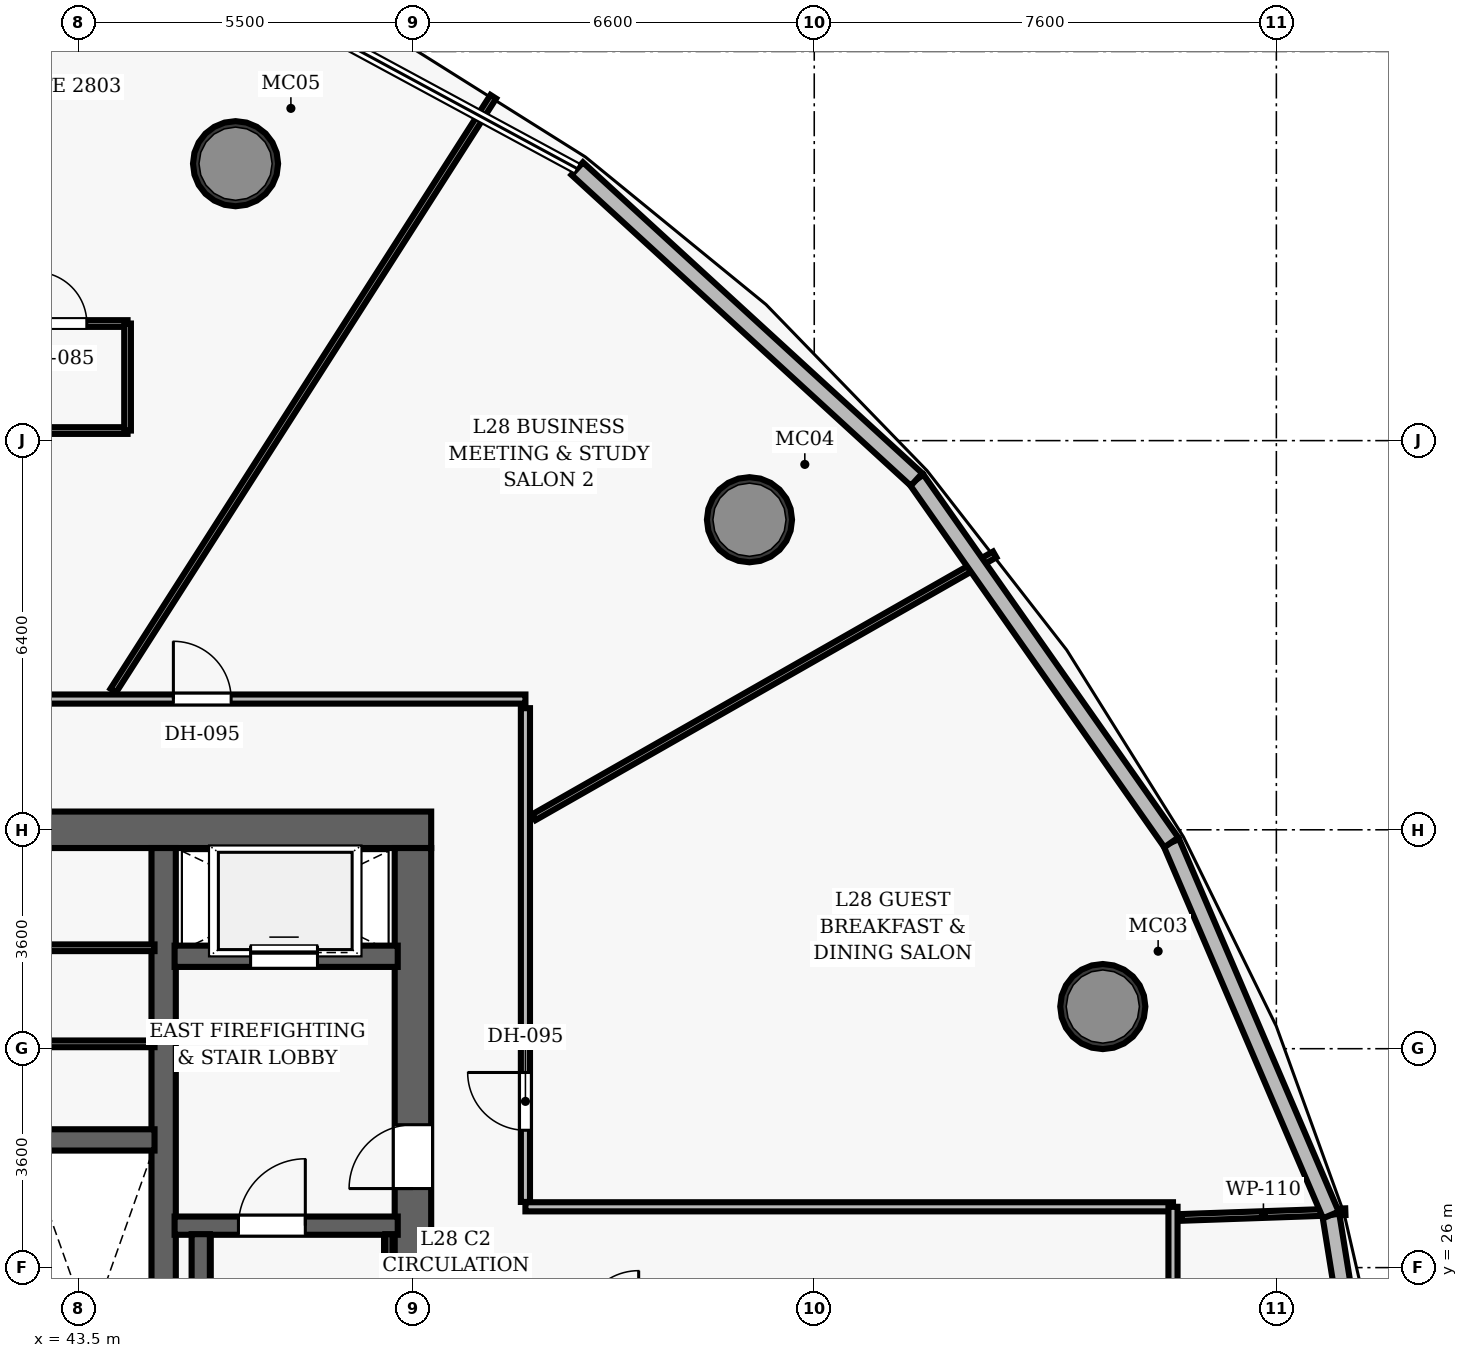
"""IFC4 building model, lengths in metres.
Left out: names, types, materials, properties, quantities, classifications, styles, units other than length and angle.
Written with IfcOpenShell. Run it as: python <this file> out.ifc"""

import sys

from ifc_helpers import new_model, si_unit, direction, frame, frame_2d, origin, origin_2d, place, context, subcontext, project, spatial, rectangle, hollow_circle, extrude, element, fill, save


model = new_model("IFC4")
c1 = context("Model", 3, precision=1e-05, world=origin(), true_north=direction((0.0, 1.0)))
c2 = subcontext(c1, "Body", "Model", "MODEL_VIEW")
j1 = project(units=[si_unit("LENGTHUNIT", "METRE"), si_unit("PLANEANGLEUNIT", "RADIAN")], contexts=[c1])
p1 = place(None, origin())
s1 = spatial("IfcSite", under=j1, at=p1, CompositionType="ELEMENT")
p2 = place(p1, origin())
s2 = spatial("IfcBuilding", under=s1, at=p2, CompositionType="ELEMENT")
p3 = place(p2, frame((0.0, 0.0, 116.8)))
s3 = spatial("IfcBuildingStorey", under=s2, at=p3, CompositionType="ELEMENT", Elevation=116.8)
p4 = place(p3, frame((26.7, 33.2, 0.0), z_axis=(0.0, 0.0, 1.0), x_axis=(1.0, 0.0, 0.0)))
e1 = element("IfcWall", 1, at=p4, inside=s3, PredefinedType="SHEAR", context=c2, shape_type="SweptSolid", body=[
    extrude(rectangle(XDim=22.6, YDim=0.6, at=frame_2d((11.3, 0.0))), origin(), (0.0, 0.0, 1.0), 3.5),
])
p5 = place(p4, frame((4.62, 0.0, 0.0)))
e2 = element("IfcOpeningElement", 2, at=p5, cuts=e1, PredefinedType="OPENING", context=c2, shape_type="SweptSolid", body=[
    extrude(rectangle(XDim=1.05, YDim=2.15, at=frame_2d((0.525, 1.075))), frame((0.0, 0.31, 0.0), z_axis=(0.0, -1.0, 0.0), x_axis=(1.0, 0.0, 0.0)), (0.0, 0.0, 1.0), 0.62),
])
p6 = place(p4, frame((14.52, 0.0, 0.0)))
e3 = element("IfcOpeningElement", 3, at=p6, cuts=e1, PredefinedType="OPENING", context=c2, shape_type="SweptSolid", body=[
    extrude(rectangle(XDim=1.05, YDim=2.15, at=frame_2d((0.525, 1.075))), frame((0.0, 0.31, 0.0), z_axis=(0.0, -1.0, 0.0), x_axis=(1.0, 0.0, 0.0)), (0.0, 0.0, 1.0), 0.62),
])
p7 = place(p3, frame((49.0, 19.1, 0.0), z_axis=(0.0, 0.0, 1.0), x_axis=(0.0, 1.0, 0.0)))
e4 = element("IfcWall", 4, at=p7, inside=s3, PredefinedType="SHEAR", context=c2, shape_type="SweptSolid", body=[
    extrude(rectangle(XDim=13.8, YDim=0.6, at=frame_2d((6.9, 0.0))), origin(), (0.0, 0.0, 1.0), 3.5),
])
p8 = place(p7, frame((8.2, 0.0, 0.0)))
e5 = element("IfcOpeningElement", 5, at=p8, cuts=e4, PredefinedType="OPENING", context=c2, shape_type="SweptSolid", body=[
    extrude(rectangle(XDim=1.05, YDim=2.15, at=frame_2d((0.525, 1.075))), frame((0.0, 0.31, 0.0), z_axis=(0.0, -1.0, 0.0), x_axis=(1.0, 0.0, 0.0)), (0.0, 0.0, 1.0), 0.62),
])
p9 = place(p3, frame((44.9, 19.1, 0.0), z_axis=(0.0, 0.0, 1.0), x_axis=(0.0, 1.0, 0.0)))
e6 = element("IfcWall", 6, at=p9, inside=s3, PredefinedType="SHEAR", context=c2, shape_type="SweptSolid", body=[
    extrude(rectangle(XDim=13.8, YDim=0.4, at=frame_2d((6.9, 0.0))), origin(), (0.0, 0.0, 1.0), 3.5),
])
for number, where, z_axis, x_axis in (
    (7, (60.346, 30.293, 0.0), (0.0, 0.0, 1.0), (1.0, 0.0, 0.0)),
    (8, (54.535, 38.299, 0.0), (0.0, 0.0, 1.0), (1.0, 0.0, 0.0)),
    (9, (46.083, 44.154, 0.0), (0.0, 0.0, 1.0), (1.0, 0.0, 0.0)),
):
    element("IfcColumn", number, at=place(p3, frame(where, z_axis=z_axis, x_axis=x_axis)), inside=s3, PredefinedType="COLUMN", context=c2, shape_type="SweptSolid", body=[
        extrude(hollow_circle(Radius=0.7, WallThickness=0.055, at=origin_2d()), origin(), (0.0, 0.0, 1.0), 3.5),
    ])
p10 = place(p3, frame((45.08, 26.69, 0.0), z_axis=(0.0, 0.0, 1.0), x_axis=(1.0, 0.0, 0.0)))
e10 = element("IfcWall", 10, at=p10, inside=s3, PredefinedType="SHEAR", context=c2, shape_type="SweptSolid", body=[
    extrude(rectangle(XDim=3.67, YDim=0.3, at=frame_2d((1.835, 0.0))), origin(), (0.0, 0.0, 1.0), 3.5),
])
p11 = place(p10, frame((1.05, 0.0, 0.0)))
e11 = element("IfcOpeningElement", 11, at=p11, cuts=e10, PredefinedType="OPENING", context=c2, shape_type="SweptSolid", body=[
    extrude(rectangle(XDim=1.1, YDim=2.15, at=frame_2d((0.55, 1.075))), frame((0.0, 0.16, 0.0), z_axis=(0.0, -1.0, 0.0), x_axis=(1.0, 0.0, 0.0)), (0.0, 0.0, 1.0), 0.32),
])
p12 = place(p3, frame((45.51, 19.05, 0.0), z_axis=(0.0, 0.0, 1.0), x_axis=(0.0, 1.0, 0.0)))
e12 = element("IfcWall", 12, at=p12, inside=s3, PredefinedType="SHEAR", context=c2, shape_type="SweptSolid", body=[
    extrude(rectangle(XDim=7.5, YDim=0.3, at=frame_2d((3.75, 0.0))), origin(), (0.0, 0.0, 1.0), 3.5),
])
p13 = place(p3, frame((48.605, 19.1, 0.0), z_axis=(0.0, 0.0, 1.0), x_axis=(0.0, 1.0, 0.0)))
e13 = element("IfcWall", 13, at=p13, inside=s3, PredefinedType="SHEAR", context=c2, shape_type="SweptSolid", body=[
    extrude(rectangle(XDim=7.45, YDim=0.12, at=frame_2d((3.725, 0.0))), origin(), (0.0, 0.0, 1.0), 3.5),
])
p14 = place(p3, frame((45.08, 31.12, 0.0), z_axis=(0.0, 0.0, 1.0), x_axis=(1.0, 0.0, 0.0)))
e14 = element("IfcWall", 14, at=p14, inside=s3, PredefinedType="SHEAR", context=c2, shape_type="SweptSolid", body=[
    extrude(rectangle(XDim=3.67, YDim=0.35, at=frame_2d((1.835, 0.0))), origin(), (0.0, 0.0, 1.0), 2.675),
])
p15 = place(p14, frame((1.25, 0.0, 0.0)))
e15 = element("IfcOpeningElement", 15, at=p15, cuts=e14, PredefinedType="OPENING", context=c2, shape_type="SweptSolid", body=[
    extrude(rectangle(XDim=1.1, YDim=2.15, at=frame_2d((0.55, 1.075))), frame((0.0, 0.185, 0.0), z_axis=(0.0, -1.0, 0.0), x_axis=(1.0, 0.0, 0.0)), (0.0, 0.0, 1.0), 0.37),
])
p16 = place(p3, frame((42.72, 28.1, 0.0), z_axis=(0.0, 0.0, 1.0), x_axis=(1.0, 0.0, 0.0)))
e16 = element("IfcWall", 16, at=p16, inside=s3, PredefinedType="SHEAR", context=c2, shape_type="SweptSolid", body=[
    extrude(rectangle(XDim=2.03, YDim=0.35, at=frame_2d((1.015, 0.0))), origin(), (0.0, 0.0, 1.0), 2.675),
])
for number, where, z_axis, x_axis in (
    (17, (42.55, 29.68, 0.0), (0.0, 0.0, 1.0), (1.0, 0.0, 0.0)),
    (18, (42.55, 31.26, 0.0), (0.0, 0.0, 1.0), (1.0, 0.0, 0.0)),
):
    element("IfcWall", number, at=place(p3, frame(where, z_axis=z_axis, x_axis=x_axis)), inside=s3, PredefinedType="PARTITIONING", context=c2, shape_type="SweptSolid", body=[
        extrude(rectangle(XDim=2.2, YDim=0.11, at=frame_2d((1.1, 0.0))), origin(), (0.0, 0.0, 1.0), 2.675),
    ])
p17 = place(p3, frame((24.85, 35.35, 0.0), z_axis=(0.0, 0.0, 1.0), x_axis=(1.0, 0.0, 0.0)))
e19 = element("IfcWall", 19, at=p17, inside=s3, PredefinedType="PARTITIONING", context=c2, shape_type="SweptSolid", body=[
    extrude(rectangle(XDim=26.0, YDim=0.15, at=frame_2d((13.0, 0.0))), origin(), (0.0, 0.0, 1.0), 2.675),
])
p18 = place(p17, frame((20.21, 0.0, 0.0)))
e20 = element("IfcOpeningElement", 20, at=p18, cuts=e19, PredefinedType="OPENING", context=c2, shape_type="SweptSolid", body=[
    extrude(rectangle(XDim=0.95, YDim=2.15, at=frame_2d((0.475, 1.075))), frame((0.0, 0.085, 0.0), z_axis=(0.0, -1.0, 0.0), x_axis=(1.0, 0.0, 0.0)), (0.0, 0.0, 1.0), 0.17),
])
p19 = place(p17, frame((14.655, 0.0, 0.0)))
e21 = element("IfcOpeningElement", 21, at=p19, cuts=e19, PredefinedType="OPENING", context=c2, shape_type="SweptSolid", body=[
    extrude(rectangle(XDim=0.95, YDim=2.15, at=frame_2d((0.475, 1.075))), frame((0.0, 0.085, 0.0), z_axis=(0.0, -1.0, 0.0), x_axis=(1.0, 0.0, 0.0)), (0.0, 0.0, 1.0), 0.17),
])
p20 = place(p17, frame((12.441, 0.0, 0.0)))
e22 = element("IfcOpeningElement", 22, at=p20, cuts=e19, PredefinedType="OPENING", context=c2, shape_type="SweptSolid", body=[
    extrude(rectangle(XDim=0.95, YDim=2.15, at=frame_2d((0.475, 1.075))), frame((0.0, 0.085, 0.0), z_axis=(0.0, -1.0, 0.0), x_axis=(1.0, 0.0, 0.0)), (0.0, 0.0, 1.0), 0.17),
])
p21 = place(p17, frame((6.959, 0.0, 0.0)))
e23 = element("IfcOpeningElement", 23, at=p21, cuts=e19, PredefinedType="OPENING", context=c2, shape_type="SweptSolid", body=[
    extrude(rectangle(XDim=0.95, YDim=2.15, at=frame_2d((0.475, 1.075))), frame((0.0, 0.085, 0.0), z_axis=(0.0, -1.0, 0.0), x_axis=(1.0, 0.0, 0.0)), (0.0, 0.0, 1.0), 0.17),
])
p22 = place(p3, frame((50.85, 27.08, 0.0), z_axis=(0.0, 0.0, 1.0), x_axis=(0.0, 1.0, 0.0)))
e24 = element("IfcWall", 24, at=p22, inside=s3, PredefinedType="PARTITIONING", context=c2, shape_type="SweptSolid", body=[
    extrude(rectangle(XDim=8.12, YDim=0.15, at=frame_2d((4.06, 0.0))), origin(), (0.0, 0.0, 1.0), 2.675),
])
p23 = place(p22, frame((1.179, 0.0, 0.0)))
e25 = element("IfcOpeningElement", 25, at=p23, cuts=e24, PredefinedType="OPENING", context=c2, shape_type="SweptSolid", body=[
    extrude(rectangle(XDim=0.95, YDim=2.15, at=frame_2d((0.475, 1.075))), frame((0.0, 0.085, 0.0), z_axis=(0.0, -1.0, 0.0), x_axis=(1.0, 0.0, 0.0)), (0.0, 0.0, 1.0), 0.17),
])
p24 = place(p3, frame((50.85, 27.0, 0.0), z_axis=(0.0, 0.0, 1.0), x_axis=(1.0, 0.0, 0.0)))
e26 = element("IfcWall", 26, at=p24, inside=s3, PredefinedType="PARTITIONING", context=c2, shape_type="SweptSolid", body=[
    extrude(rectangle(XDim=10.65, YDim=0.15, at=frame_2d((5.325, 0.0))), origin(), (0.0, 0.0, 1.0), 2.675),
])
p25 = place(p3, frame((61.5, 25.0, 0.0), z_axis=(0.0, 0.0, 1.0), x_axis=(0.0, 1.0, 0.0)))
e27 = element("IfcWall", 27, at=p25, inside=s3, PredefinedType="PARTITIONING", context=c2, shape_type="SweptSolid", body=[
    extrude(rectangle(XDim=2.0, YDim=0.15, at=frame_2d((1.0, 0.0))), origin(), (0.0, 0.0, 1.0), 2.675),
])
p26 = place(p3, frame((61.64, 26.825, 0.0), z_axis=(0.0, 0.0, 1.0), x_axis=(0.999389106182, 0.03494874026, 0.0)))
e28 = element("IfcWall", 28, at=p26, inside=s3, PredefinedType="PARTITIONING", context=c2, shape_type="SweptSolid", body=[
    extrude(rectangle(XDim=2.697, YDim=0.11, at=frame_2d((1.348, 0.0))), origin(), (0.0, 0.0, 1.0), 2.675),
])
p27 = place(p3, frame((50.99, 33.407, 0.0), z_axis=(0.0, 0.0, 1.0), x_axis=(0.868694051494, 0.495349013221, 0.0)))
e29 = element("IfcWall", 29, at=p27, inside=s3, PredefinedType="PARTITIONING", context=c2, shape_type="SweptSolid", body=[
    extrude(rectangle(XDim=8.723, YDim=0.11, at=frame_2d((4.361, 0.0))), origin(), (0.0, 0.0, 1.0), 2.675),
])
p28 = place(p3, frame((44.073, 35.49, 0.0), z_axis=(0.0, 0.0, 1.0), x_axis=(0.538998120289, 0.842306966803, 0.0)))
e30 = element("IfcWall", 30, at=p28, inside=s3, PredefinedType="PARTITIONING", context=c2, shape_type="SweptSolid", body=[
    extrude(rectangle(XDim=11.593, YDim=0.11, at=frame_2d((5.797, 0.0))), origin(), (0.0, 0.0, 1.0), 2.675),
])
p29 = place(p3, frame((42.107, 39.766, 0.0), z_axis=(0.0, 0.0, 1.0), x_axis=(1.0, 0.0, 0.0)))
e31 = element("IfcWall", 31, at=p29, inside=s3, PredefinedType="PARTITIONING", context=c2, shape_type="SweptSolid", body=[
    extrude(rectangle(XDim=2.2, YDim=0.11, at=frame_2d((1.1, 0.0))), origin(), (0.0, 0.0, 1.0), 2.675),
])
p30 = place(p3, frame((42.107, 41.526, 0.0), z_axis=(0.0, 0.0, 1.0), x_axis=(1.0, 0.0, 0.0)))
e32 = element("IfcWall", 32, at=p30, inside=s3, PredefinedType="PARTITIONING", context=c2, shape_type="SweptSolid", body=[
    extrude(rectangle(XDim=2.2, YDim=0.11, at=frame_2d((1.1, 0.0))), origin(), (0.0, 0.0, 1.0), 2.675),
])
p31 = place(p30, frame((0.68, 0.0, 0.0)))
e33 = element("IfcOpeningElement", 33, at=p31, cuts=e32, PredefinedType="OPENING", context=c2, shape_type="SweptSolid", body=[
    extrude(rectangle(XDim=0.85, YDim=2.1, at=frame_2d((0.425, 1.05))), frame((0.0, 0.065, 0.0), z_axis=(0.0, -1.0, 0.0), x_axis=(1.0, 0.0, 0.0)), (0.0, 0.0, 1.0), 0.13),
])
p32 = place(p3, frame((44.307, 39.766, 0.0), z_axis=(0.0, 0.0, 1.0), x_axis=(0.0, 1.0, 0.0)))
e34 = element("IfcWall", 34, at=p32, inside=s3, PredefinedType="PARTITIONING", context=c2, shape_type="SweptSolid", body=[
    extrude(rectangle(XDim=1.76, YDim=0.11, at=frame_2d((0.88, 0.0))), origin(), (0.0, 0.0, 1.0), 2.675),
])
p33 = place(p3, frame((64.096, 26.866, 0.0), z_axis=(0.0, 0.0, 1.0), x_axis=(0.158909460881, -0.987293159726, 0.0)))
e35 = element("IfcWall", 35, at=p33, inside=s3, PredefinedType="SOLIDWALL", context=c2, shape_type="SweptSolid", body=[
    extrude(rectangle(XDim=5.823, YDim=0.28, at=frame_2d((2.911, 0.0))), origin(), (0.0, 0.0, 1.0), 3.26),
])
p34 = place(p3, frame((61.472, 32.992, 0.0), z_axis=(0.0, 0.0, 1.0), x_axis=(0.393733615398, -0.919224586326, 0.0)))
e36 = element("IfcWall", 36, at=p34, inside=s3, PredefinedType="SOLIDWALL", context=c2, shape_type="SweptSolid", body=[
    extrude(rectangle(XDim=6.665, YDim=0.28, at=frame_2d((3.333, 0.0))), origin(), (0.0, 0.0, 1.0), 3.26),
])
p35 = place(p3, frame((57.282, 38.96, 0.0), z_axis=(0.0, 0.0, 1.0), x_axis=(0.574634715728, -0.818410009396, 0.0)))
e37 = element("IfcWall", 37, at=p35, inside=s3, PredefinedType="SOLIDWALL", context=c2, shape_type="SweptSolid", body=[
    extrude(rectangle(XDim=7.292, YDim=0.28, at=frame_2d((3.646, 0.0))), origin(), (0.0, 0.0, 1.0), 3.26),
])
p36 = place(p3, frame((51.701, 44.074, 0.0), z_axis=(0.0, 0.0, 1.0), x_axis=(0.737285337307, -0.675581476502, 0.0)))
e38 = element("IfcWall", 38, at=p36, inside=s3, PredefinedType="SOLIDWALL", context=c2, shape_type="SweptSolid", body=[
    extrude(rectangle(XDim=7.569, YDim=0.28, at=frame_2d((3.785, 0.0))), origin(), (0.0, 0.0, 1.0), 3.26),
])
p37 = place(p11, origin())
e39 = element("IfcDoor", 39, at=p37, inside=s3, OperationType="SINGLE_SWING_RIGHT", PredefinedType="DOOR", context=c2, shape_type="SweptSolid", body=[
    extrude(rectangle(XDim=1.1, YDim=2.15, at=frame_2d((0.55, 1.075))), frame((0.0, 0.025, 0.0), z_axis=(0.0, -1.0, 0.0), x_axis=(1.0, 0.0, 0.0)), (0.0, 0.0, 1.0), 0.05),
])
fill(e11, e39)
p38 = place(p8, origin())
e40 = element("IfcDoor", 40, at=p38, inside=s3, OperationType="SINGLE_SWING_LEFT", PredefinedType="DOOR", context=c2, shape_type="SweptSolid", body=[
    extrude(rectangle(XDim=1.05, YDim=2.15, at=frame_2d((0.525, 1.075))), frame((0.0, 0.025, 0.0), z_axis=(0.0, -1.0, 0.0), x_axis=(1.0, 0.0, 0.0)), (0.0, 0.0, 1.0), 0.05),
])
fill(e5, e40)
p39 = place(p23, origin())
e41 = element("IfcDoor", 41, at=p39, inside=s3, OperationType="SINGLE_SWING_RIGHT", PredefinedType="DOOR", context=c2, shape_type="SweptSolid", body=[
    extrude(rectangle(XDim=0.95, YDim=2.15, at=frame_2d((0.475, 1.075))), frame((0.0, 0.025, 0.0), z_axis=(0.0, -1.0, 0.0), x_axis=(1.0, 0.0, 0.0)), (0.0, 0.0, 1.0), 0.05),
])
fill(e25, e41)
p40 = place(p18, origin())
e42 = element("IfcDoor", 42, at=p40, inside=s3, OperationType="SINGLE_SWING_LEFT", PredefinedType="DOOR", context=c2, shape_type="SweptSolid", body=[
    extrude(rectangle(XDim=0.95, YDim=2.15, at=frame_2d((0.475, 1.075))), frame((0.0, 0.025, 0.0), z_axis=(0.0, -1.0, 0.0), x_axis=(1.0, 0.0, 0.0)), (0.0, 0.0, 1.0), 0.05),
])
fill(e20, e42)
p41 = place(p31, origin())
e43 = element("IfcDoor", 43, at=p41, inside=s3, OperationType="SINGLE_SWING_LEFT", PredefinedType="DOOR", context=c2, shape_type="SweptSolid", body=[
    extrude(rectangle(XDim=0.85, YDim=2.1, at=frame_2d((0.425, 1.05))), frame((0.0, 0.025, 0.0), z_axis=(0.0, -1.0, 0.0), x_axis=(1.0, 0.0, 0.0)), (0.0, 0.0, 1.0), 0.05),
])
fill(e33, e43)
p42 = place(p15, origin())
e44 = element("IfcDoor", 44, at=p42, inside=s3, OperationType="SLIDING_TO_LEFT", PredefinedType="DOOR", context=c2, shape_type="SweptSolid", body=[
    extrude(rectangle(XDim=1.1, YDim=2.15, at=frame_2d((0.55, 1.075))), frame((0.0, 0.025, 0.0), z_axis=(0.0, -1.0, 0.0), x_axis=(1.0, 0.0, 0.0)), (0.0, 0.0, 1.0), 0.05),
])
fill(e15, e44)
save(model, sys.argv[1])
